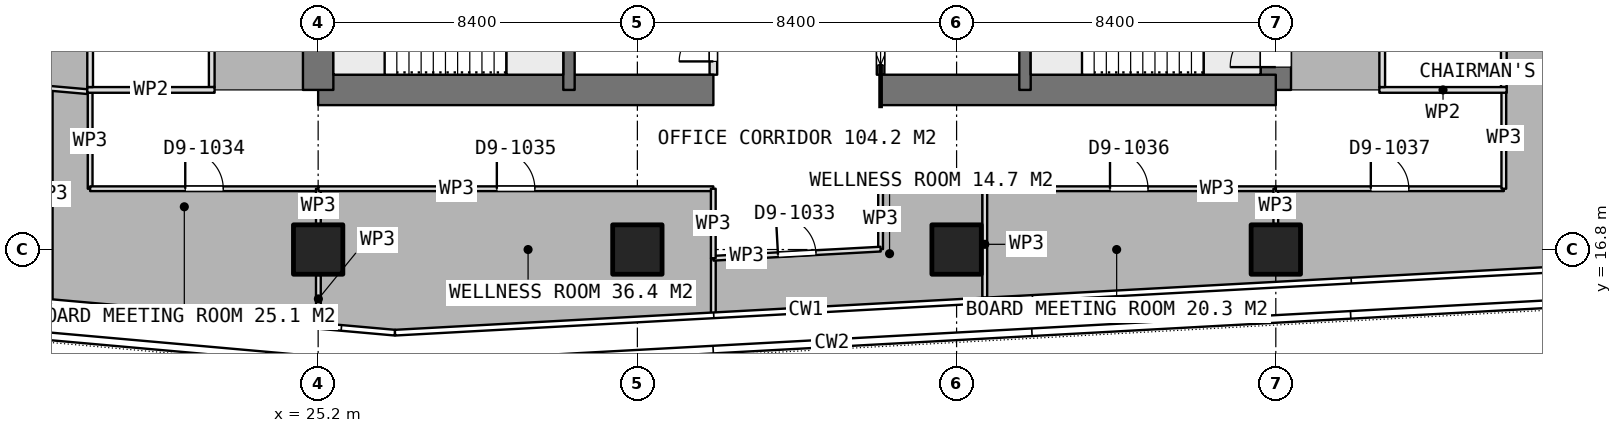
"""IFC4 building model, lengths in metres.
Left out: names, types, materials, properties, quantities, classifications, styles, units other than length and angle.
Written with IfcOpenShell. Run it as: python <this file> out.ifc"""

import sys

from ifc_helpers import new_model, si_unit, direction, frame, frame_2d, origin, origin_2d, place, context, subcontext, project, spatial, rectangle, extrude, element, fill, save


model = new_model("IFC4")
c1 = context("Model", 3, precision=1e-05, world=origin(), true_north=direction((0.0, 1.0)))
c2 = subcontext(c1, "Body", "Model", "MODEL_VIEW")
j1 = project(units=[si_unit("LENGTHUNIT", "METRE"), si_unit("PLANEANGLEUNIT", "RADIAN")], contexts=[c1])
p1 = place(None, origin())
s1 = spatial("IfcSite", under=j1, at=p1, CompositionType="ELEMENT")
p2 = place(p1, origin())
s2 = spatial("IfcBuilding", under=s1, at=p2, CompositionType="ELEMENT")
p3 = place(p2, frame((0.0, 0.0, 280.1)))
s3 = spatial("IfcBuildingStorey", under=s2, at=p3, CompositionType="ELEMENT", Elevation=280.1)
p4 = place(p3, frame((25.2, 21.0, 0.0), z_axis=(0.0, 0.0, 1.0), x_axis=(1.0, 0.0, 0.0)))
e1 = element("IfcWall", 1, at=p4, inside=s3, PredefinedType="SHEAR", context=c2, shape_type="SweptSolid", body=[
    extrude(rectangle(XDim=10.4, YDim=0.8, at=frame_2d((5.2, 0.0))), origin(), (0.0, 0.0, 1.0), 3.75),
])
p5 = place(p3, frame((40.0, 21.0, 0.0), z_axis=(0.0, 0.0, 1.0), x_axis=(1.0, 0.0, 0.0)))
e2 = element("IfcWall", 2, at=p5, inside=s3, PredefinedType="SHEAR", context=c2, shape_type="SweptSolid", body=[
    extrude(rectangle(XDim=10.4, YDim=0.8, at=frame_2d((5.2, 0.0))), origin(), (0.0, 0.0, 1.0), 3.75),
])
p6 = place(p3, frame((25.2, 21.0, 0.0), z_axis=(0.0, 0.0, 1.0), x_axis=(0.0, 1.0, 0.0)))
e3 = element("IfcWall", 3, at=p6, inside=s3, PredefinedType="SHEAR", context=c2, shape_type="SweptSolid", body=[
    extrude(rectangle(XDim=25.2, YDim=0.8, at=frame_2d((12.6, 0.0))), origin(), (0.0, 0.0, 1.0), 3.75),
])
p7 = place(p6, frame((7.8, 0.0, 0.0)))
e4 = element("IfcOpeningElement", 4, at=p7, cuts=e3, PredefinedType="OPENING", context=c2, shape_type="SweptSolid", body=[
    extrude(rectangle(XDim=1.2, YDim=2.1, at=frame_2d((0.6, 1.05))), frame((0.0, 0.41, 0.0), z_axis=(0.0, -1.0, 0.0), x_axis=(1.0, 0.0, 0.0)), (0.0, 0.0, 1.0), 0.82),
])
p8 = place(p6, frame((14.25, 0.0, 0.0)))
e5 = element("IfcOpeningElement", 5, at=p8, cuts=e3, PredefinedType="OPENING", context=c2, shape_type="SweptSolid", body=[
    extrude(rectangle(XDim=0.9, YDim=2.1, at=frame_2d((0.45, 1.05))), frame((0.0, 0.41, 0.0), z_axis=(0.0, -1.0, 0.0), x_axis=(1.0, 0.0, 0.0)), (0.0, 0.0, 1.0), 0.82),
])
p9 = place(p6, frame((16.85, 0.0, 0.0)))
e6 = element("IfcOpeningElement", 6, at=p9, cuts=e3, PredefinedType="OPENING", context=c2, shape_type="SweptSolid", body=[
    extrude(rectangle(XDim=0.9, YDim=2.1, at=frame_2d((0.45, 1.05))), frame((0.0, 0.41, 0.0), z_axis=(0.0, -1.0, 0.0), x_axis=(1.0, 0.0, 0.0)), (0.0, 0.0, 1.0), 0.82),
])
p10 = place(p6, frame((18.95, 0.0, 0.0)))
e7 = element("IfcOpeningElement", 7, at=p10, cuts=e3, PredefinedType="OPENING", context=c2, shape_type="SweptSolid", body=[
    extrude(rectangle(XDim=1.2, YDim=2.1, at=frame_2d((0.6, 1.05))), frame((0.0, 0.41, 0.0), z_axis=(0.0, -1.0, 0.0), x_axis=(1.0, 0.0, 0.0)), (0.0, 0.0, 1.0), 0.82),
])
p11 = place(p3, frame((50.4, 21.0, 0.0), z_axis=(0.0, 0.0, 1.0), x_axis=(0.0, 1.0, 0.0)))
e8 = element("IfcWall", 8, at=p11, inside=s3, PredefinedType="SHEAR", context=c2, shape_type="SweptSolid", body=[
    extrude(rectangle(XDim=25.2, YDim=0.8, at=frame_2d((12.6, 0.0))), origin(), (0.0, 0.0, 1.0), 3.75),
])
p12 = place(p11, frame((16.2, 0.0, 0.0)))
e9 = element("IfcOpeningElement", 9, at=p12, cuts=e8, PredefinedType="OPENING", context=c2, shape_type="SweptSolid", body=[
    extrude(rectangle(XDim=1.2, YDim=2.1, at=frame_2d((0.6, 1.05))), frame((0.0, 0.41, 0.0), z_axis=(0.0, -1.0, 0.0), x_axis=(1.0, 0.0, 0.0)), (0.0, 0.0, 1.0), 0.82),
])
p13 = place(p11, frame((10.05, 0.0, 0.0)))
e10 = element("IfcOpeningElement", 10, at=p13, cuts=e8, PredefinedType="OPENING", context=c2, shape_type="SweptSolid", body=[
    extrude(rectangle(XDim=0.9, YDim=2.1, at=frame_2d((0.45, 1.05))), frame((0.0, 0.41, 0.0), z_axis=(0.0, -1.0, 0.0), x_axis=(1.0, 0.0, 0.0)), (0.0, 0.0, 1.0), 0.82),
])
p14 = place(p11, frame((7.45, 0.0, 0.0)))
e11 = element("IfcOpeningElement", 11, at=p14, cuts=e8, PredefinedType="OPENING", context=c2, shape_type="SweptSolid", body=[
    extrude(rectangle(XDim=0.9, YDim=2.1, at=frame_2d((0.45, 1.05))), frame((0.0, 0.41, 0.0), z_axis=(0.0, -1.0, 0.0), x_axis=(1.0, 0.0, 0.0)), (0.0, 0.0, 1.0), 0.82),
])
p15 = place(p11, frame((0.6, 0.0, 0.0)))
e12 = element("IfcOpeningElement", 12, at=p15, cuts=e8, PredefinedType="OPENING", context=c2, shape_type="SweptSolid", body=[
    extrude(rectangle(XDim=1.2, YDim=2.1, at=frame_2d((0.6, 1.05))), frame((0.0, 0.41, 0.0), z_axis=(0.0, -1.0, 0.0), x_axis=(1.0, 0.0, 0.0)), (0.0, 0.0, 1.0), 0.82),
])
for number, where, z_axis, x_axis in (
    (13, (31.8, 21.0, 0.0), (0.0, 0.0, 1.0), (0.0, 1.0, 0.0)),
    (14, (43.8, 21.0, 0.0), (0.0, 0.0, 1.0), (0.0, 1.0, 0.0)),
):
    element("IfcWall", number, at=place(p3, frame(where, z_axis=z_axis, x_axis=x_axis)), inside=s3, PredefinedType="SHEAR", context=c2, shape_type="SweptSolid", body=[
        extrude(rectangle(XDim=25.2, YDim=0.3, at=frame_2d((12.6, 0.0))), origin(), (0.0, 0.0, 1.0), 3.75),
    ])
for number, where, z_axis, x_axis in (
    (15, (25.2, 16.8, 0.0), (0.0, 0.0, 1.0), (1.0, 0.0, 0.0)),
    (16, (33.6, 16.8, 0.0), (0.0, 0.0, 1.0), (1.0, 0.0, 0.0)),
    (17, (42.0, 16.8, 0.0), (0.0, 0.0, 1.0), (1.0, 0.0, 0.0)),
    (18, (50.4, 16.8, 0.0), (0.0, 0.0, 1.0), (1.0, 0.0, 0.0)),
):
    element("IfcColumn", number, at=place(p3, frame(where, z_axis=z_axis, x_axis=x_axis)), inside=s3, PredefinedType="COLUMN", context=c2, shape_type="SweptSolid", body=[
        extrude(rectangle(XDim=1.3, YDim=1.3, at=origin_2d()), origin(), (0.0, 0.0, 1.0), 3.75),
    ])
p16 = place(p3, frame((40.0, 21.4, 0.0), z_axis=(0.0, 0.0, 1.0), x_axis=(0.0, 1.0, 0.0)))
e19 = element("IfcWall", 19, at=p16, inside=s3, PredefinedType="PARTITIONING", context=c2, shape_type="SweptSolid", body=[
    extrude(rectangle(XDim=1.85, YDim=0.2, at=frame_2d((0.925, 0.0))), origin(), (0.0, 0.0, 1.0), 3.5),
])
p17 = place(p16, frame((0.25, 0.0, 0.0)))
e20 = element("IfcOpeningElement", 20, at=p17, cuts=e19, PredefinedType="OPENING", context=c2, shape_type="SweptSolid", body=[
    extrude(rectangle(XDim=1.1, YDim=2.1, at=frame_2d((0.55, 1.05))), frame((0.0, 0.11, 0.0), z_axis=(0.0, -1.0, 0.0), x_axis=(1.0, 0.0, 0.0)), (0.0, 0.0, 1.0), 0.22),
])
p18 = place(p3, frame((35.6, 21.4, 0.0), z_axis=(0.0, 0.0, 1.0), x_axis=(0.0, 1.0, 0.0)))
e21 = element("IfcWall", 21, at=p18, inside=s3, PredefinedType="PARTITIONING", context=c2, shape_type="SweptSolid", body=[
    extrude(rectangle(XDim=1.85, YDim=0.2, at=frame_2d((0.925, 0.0))), origin(), (0.0, 0.0, 1.0), 3.5),
])
p19 = place(p18, frame((0.35, 0.0, 0.0)))
e22 = element("IfcOpeningElement", 22, at=p19, cuts=e21, PredefinedType="OPENING", context=c2, shape_type="SweptSolid", body=[
    extrude(rectangle(XDim=0.9, YDim=2.1, at=frame_2d((0.45, 1.05))), frame((0.0, 0.11, 0.0), z_axis=(0.0, -1.0, 0.0), x_axis=(1.0, 0.0, 0.0)), (0.0, 0.0, 1.0), 0.22),
])
p20 = place(p3, frame((19.125, 21.0, 0.0), z_axis=(0.0, 0.0, 1.0), x_axis=(1.0, 0.0, 0.0)))
e23 = element("IfcWall", 23, at=p20, inside=s3, PredefinedType="PARTITIONING", context=c2, shape_type="SweptSolid", body=[
    extrude(rectangle(XDim=3.35, YDim=0.15, at=frame_2d((1.675, 0.0))), origin(), (0.0, 0.0, 1.0), 3.5),
])
p21 = place(p3, frame((19.2, 21.075, 0.0), z_axis=(0.0, 0.0, 1.0), x_axis=(0.0, 1.0, 0.0)))
e24 = element("IfcWall", 24, at=p21, inside=s3, PredefinedType="PARTITIONING", context=c2, shape_type="SweptSolid", body=[
    extrude(rectangle(XDim=6.85, YDim=0.15, at=frame_2d((3.425, 0.0))), origin(), (0.0, 0.0, 1.0), 3.5),
])
p22 = place(p3, frame((22.4, 21.075, 0.0), z_axis=(0.0, 0.0, 1.0), x_axis=(0.0, 1.0, 0.0)))
e25 = element("IfcWall", 25, at=p22, inside=s3, PredefinedType="PARTITIONING", context=c2, shape_type="SweptSolid", body=[
    extrude(rectangle(XDim=6.85, YDim=0.15, at=frame_2d((3.425, 0.0))), origin(), (0.0, 0.0, 1.0), 3.5),
])
p23 = place(p22, frame((2.925, 0.0, 0.0)))
e26 = element("IfcOpeningElement", 26, at=p23, cuts=e25, PredefinedType="OPENING", context=c2, shape_type="SweptSolid", body=[
    extrude(rectangle(XDim=1.0, YDim=2.1, at=frame_2d((0.5, 1.05))), frame((0.0, 0.085, 0.0), z_axis=(0.0, -1.0, 0.0), x_axis=(1.0, 0.0, 0.0)), (0.0, 0.0, 1.0), 0.17),
])
p24 = place(p3, frame((53.125, 21.0, 0.0), z_axis=(0.0, 0.0, 1.0), x_axis=(1.0, 0.0, 0.0)))
e27 = element("IfcWall", 27, at=p24, inside=s3, PredefinedType="PARTITIONING", context=c2, shape_type="SweptSolid", body=[
    extrude(rectangle(XDim=3.35, YDim=0.15, at=frame_2d((1.675, 0.0))), origin(), (0.0, 0.0, 1.0), 3.5),
])
p25 = place(p3, frame((53.2, 21.075, 0.0), z_axis=(0.0, 0.0, 1.0), x_axis=(0.0, 1.0, 0.0)))
e28 = element("IfcWall", 28, at=p25, inside=s3, PredefinedType="PARTITIONING", context=c2, shape_type="SweptSolid", body=[
    extrude(rectangle(XDim=6.85, YDim=0.15, at=frame_2d((3.425, 0.0))), origin(), (0.0, 0.0, 1.0), 3.5),
])
p26 = place(p25, frame((2.925, 0.0, 0.0)))
e29 = element("IfcOpeningElement", 29, at=p26, cuts=e28, PredefinedType="OPENING", context=c2, shape_type="SweptSolid", body=[
    extrude(rectangle(XDim=1.0, YDim=2.1, at=frame_2d((0.5, 1.05))), frame((0.0, 0.085, 0.0), z_axis=(0.0, -1.0, 0.0), x_axis=(1.0, 0.0, 0.0)), (0.0, 0.0, 1.0), 0.17),
])
p27 = place(p3, frame((56.4, 21.075, 0.0), z_axis=(0.0, 0.0, 1.0), x_axis=(0.0, 1.0, 0.0)))
e30 = element("IfcWall", 30, at=p27, inside=s3, PredefinedType="PARTITIONING", context=c2, shape_type="SweptSolid", body=[
    extrude(rectangle(XDim=6.85, YDim=0.15, at=frame_2d((3.425, 0.0))), origin(), (0.0, 0.0, 1.0), 3.5),
])
p28 = place(p3, frame((40.0, 16.811, 0.0), z_axis=(0.0, 0.0, 1.0), x_axis=(0.0, 1.0, 0.0)))
e31 = element("IfcWall", 31, at=p28, inside=s3, PredefinedType="PARTITIONING", context=c2, shape_type="SweptSolid", body=[
    extrude(rectangle(XDim=1.589, YDim=0.125, at=frame_2d((0.794, 0.0))), origin(), (0.0, 0.0, 1.0), 3.5),
])
p29 = place(p3, frame((40.0, 18.4, 0.0), z_axis=(0.0, 0.0, 1.0), x_axis=(1.0, 0.0, 0.0)))
e32 = element("IfcWall", 32, at=p29, inside=s3, PredefinedType="PARTITIONING", context=c2, shape_type="SweptSolid", body=[
    extrude(rectangle(XDim=2.673, YDim=0.125, at=frame_2d((1.336, 0.0))), origin(), (0.0, 0.0, 1.0), 3.5),
])
p30 = place(p3, frame((42.742, 18.337, 0.0), z_axis=(0.0, 0.0, 1.0), x_axis=(0.0, -1.0, 0.0)))
e33 = element("IfcWall", 33, at=p30, inside=s3, PredefinedType="PARTITIONING", context=c2, shape_type="SweptSolid", body=[
    extrude(rectangle(XDim=2.799, YDim=0.125, at=frame_2d((1.399, 0.0))), origin(), (0.0, 0.0, 1.0), 3.5),
])
p31 = place(p3, frame((35.599, 15.119, 0.0), z_axis=(0.0, 0.0, 1.0), x_axis=(0.0, 1.0, 0.0)))
e34 = element("IfcWall", 34, at=p31, inside=s3, PredefinedType="PARTITIONING", context=c2, shape_type="SweptSolid", body=[
    extrude(rectangle(XDim=1.452, YDim=0.125, at=frame_2d((0.726, 0.0))), origin(), (0.0, 0.0, 1.0), 3.5),
])
p32 = place(p3, frame((35.599, 16.571, 0.0), z_axis=(0.0, 0.0, 1.0), x_axis=(0.998516419886, 0.054451439074, 0.0)))
e35 = element("IfcWall", 35, at=p32, inside=s3, PredefinedType="PARTITIONING", context=c2, shape_type="SweptSolid", body=[
    extrude(rectangle(XDim=4.407, YDim=0.125, at=frame_2d((2.204, 0.0))), origin(), (0.0, 0.0, 1.0), 3.5),
])
p33 = place(p32, frame((1.704, 0.0, 0.0)))
e36 = element("IfcOpeningElement", 36, at=p33, cuts=e35, PredefinedType="OPENING", context=c2, shape_type="SweptSolid", body=[
    extrude(rectangle(XDim=1.0, YDim=2.1, at=frame_2d((0.5, 1.05))), frame((0.0, 0.073, 0.0), z_axis=(0.0, -1.0, 0.0), x_axis=(1.0, 0.0, 0.0)), (0.0, 0.0, 1.0), 0.145),
])
p34 = place(p3, frame((42.674, 18.4, 0.0), z_axis=(0.0, 0.0, 1.0), x_axis=(1.0, 0.0, 0.0)))
e37 = element("IfcWall", 37, at=p34, inside=s3, PredefinedType="PARTITIONING", context=c2, shape_type="SweptSolid", body=[
    extrude(rectangle(XDim=7.726, YDim=0.125, at=frame_2d((3.863, 0.0))), origin(), (0.0, 0.0, 1.0), 3.5),
])
p35 = place(p34, frame((3.363, 0.0, 0.0)))
e38 = element("IfcOpeningElement", 38, at=p35, cuts=e37, PredefinedType="OPENING", context=c2, shape_type="SweptSolid", body=[
    extrude(rectangle(XDim=1.0, YDim=2.1, at=frame_2d((0.5, 1.05))), frame((0.0, 0.073, 0.0), z_axis=(0.0, -1.0, 0.0), x_axis=(1.0, 0.0, 0.0)), (0.0, 0.0, 1.0), 0.145),
])
p36 = place(p3, frame((50.4, 18.4, 0.0), z_axis=(0.0, 0.0, 1.0), x_axis=(0.0, -1.0, 0.0)))
e39 = element("IfcWall", 39, at=p36, inside=s3, PredefinedType="PARTITIONING", context=c2, shape_type="SweptSolid", body=[
    extrude(rectangle(XDim=0.93, YDim=0.125, at=frame_2d((0.465, 0.0))), origin(), (0.0, 0.0, 1.0), 3.5),
])
p37 = place(p3, frame((50.401, 18.4, 0.0), z_axis=(0.0, 0.0, 1.0), x_axis=(1.0, 0.0, 0.0)))
e40 = element("IfcWall", 40, at=p37, inside=s3, PredefinedType="PARTITIONING", context=c2, shape_type="SweptSolid", body=[
    extrude(rectangle(XDim=5.999, YDim=0.125, at=frame_2d((3.0, 0.0))), origin(), (0.0, 0.0, 1.0), 3.5),
])
p38 = place(p37, frame((2.499, 0.0, 0.0)))
e41 = element("IfcOpeningElement", 41, at=p38, cuts=e40, PredefinedType="OPENING", context=c2, shape_type="SweptSolid", body=[
    extrude(rectangle(XDim=1.0, YDim=2.1, at=frame_2d((0.5, 1.05))), frame((0.0, 0.073, 0.0), z_axis=(0.0, -1.0, 0.0), x_axis=(1.0, 0.0, 0.0)), (0.0, 0.0, 1.0), 0.145),
])
p39 = place(p3, frame((56.4, 18.4, 0.0), z_axis=(0.0, 0.0, 1.0), x_axis=(0.0, 1.0, 0.0)))
e42 = element("IfcWall", 42, at=p39, inside=s3, PredefinedType="PARTITIONING", context=c2, shape_type="SweptSolid", body=[
    extrude(rectangle(XDim=2.675, YDim=0.125, at=frame_2d((1.337, 0.0))), origin(), (0.0, 0.0, 1.0), 3.5),
])
p40 = place(p3, frame((18.149, 21.041, 0.0), z_axis=(0.0, 0.0, 1.0), x_axis=(0.0, -1.0, 0.0)))
e43 = element("IfcWall", 43, at=p40, inside=s3, PredefinedType="PARTITIONING", context=c2, shape_type="SweptSolid", body=[
    extrude(rectangle(XDim=5.541, YDim=0.125, at=frame_2d((2.771, 0.0))), origin(), (0.0, 0.0, 1.0), 3.5),
])
p41 = place(p3, frame((18.15, 21.041, 0.0), z_axis=(0.0, 0.0, 1.0), x_axis=(0.996138836376, -0.087791905459, 0.0)))
e44 = element("IfcWall", 44, at=p41, inside=s3, PredefinedType="PARTITIONING", context=c2, shape_type="SweptSolid", body=[
    extrude(rectangle(XDim=0.979, YDim=0.125, at=frame_2d((0.489, 0.0))), origin(), (0.0, 0.0, 1.0), 3.5),
])
p42 = place(p3, frame((19.2, 20.925, 0.0), z_axis=(0.0, 0.0, 1.0), x_axis=(0.0, -1.0, 0.0)))
e45 = element("IfcWall", 45, at=p42, inside=s3, PredefinedType="PARTITIONING", context=c2, shape_type="SweptSolid", body=[
    extrude(rectangle(XDim=2.525, YDim=0.125, at=frame_2d((1.263, 0.0))), origin(), (0.0, 0.0, 1.0), 3.5),
])
p43 = place(p3, frame((19.2, 18.4, 0.0), z_axis=(0.0, 0.0, 1.0), x_axis=(1.0, 0.0, 0.0)))
e46 = element("IfcWall", 46, at=p43, inside=s3, PredefinedType="PARTITIONING", context=c2, shape_type="SweptSolid", body=[
    extrude(rectangle(XDim=6.006, YDim=0.125, at=frame_2d((3.003, 0.0))), origin(), (0.0, 0.0, 1.0), 3.5),
])
p44 = place(p43, frame((2.503, 0.0, 0.0)))
e47 = element("IfcOpeningElement", 47, at=p44, cuts=e46, PredefinedType="OPENING", context=c2, shape_type="SweptSolid", body=[
    extrude(rectangle(XDim=1.0, YDim=2.1, at=frame_2d((0.5, 1.05))), frame((0.0, 0.073, 0.0), z_axis=(0.0, -1.0, 0.0), x_axis=(1.0, 0.0, 0.0)), (0.0, 0.0, 1.0), 0.145),
])
p45 = place(p3, frame((25.206, 18.4, 0.0), z_axis=(0.0, 0.0, 1.0), x_axis=(0.0, -1.0, 0.0)))
e48 = element("IfcWall", 48, at=p45, inside=s3, PredefinedType="PARTITIONING", context=c2, shape_type="SweptSolid", body=[
    extrude(rectangle(XDim=0.93, YDim=0.125, at=frame_2d((0.465, 0.0))), origin(), (0.0, 0.0, 1.0), 3.5),
])
p46 = place(p3, frame((25.206, 16.13, 0.0), z_axis=(0.0, 0.0, 1.0), x_axis=(0.0, -1.0, 0.0)))
e49 = element("IfcWall", 49, at=p46, inside=s3, PredefinedType="PARTITIONING", context=c2, shape_type="SweptSolid", body=[
    extrude(rectangle(XDim=1.258, YDim=0.125, at=frame_2d((0.629, 0.0))), origin(), (0.0, 0.0, 1.0), 3.5),
])
p47 = place(p3, frame((25.207, 18.4, 0.0), z_axis=(0.0, 0.0, 1.0), x_axis=(1.0, 0.0, 0.0)))
e50 = element("IfcWall", 50, at=p47, inside=s3, PredefinedType="PARTITIONING", context=c2, shape_type="SweptSolid", body=[
    extrude(rectangle(XDim=10.391, YDim=0.125, at=frame_2d((5.195, 0.0))), origin(), (0.0, 0.0, 1.0), 3.5),
])
p48 = place(p47, frame((4.695, 0.0, 0.0)))
e51 = element("IfcOpeningElement", 51, at=p48, cuts=e50, PredefinedType="OPENING", context=c2, shape_type="SweptSolid", body=[
    extrude(rectangle(XDim=1.0, YDim=2.1, at=frame_2d((0.5, 1.05))), frame((0.0, 0.073, 0.0), z_axis=(0.0, -1.0, 0.0), x_axis=(1.0, 0.0, 0.0)), (0.0, 0.0, 1.0), 0.145),
])
p49 = place(p3, frame((35.598, 18.4, 0.0), z_axis=(0.0, 0.0, 1.0), x_axis=(0.0, -1.0, 0.0)))
e52 = element("IfcWall", 52, at=p49, inside=s3, PredefinedType="PARTITIONING", context=c2, shape_type="SweptSolid", body=[
    extrude(rectangle(XDim=1.829, YDim=0.125, at=frame_2d((0.915, 0.0))), origin(), (0.0, 0.0, 1.0), 3.5),
])
p50 = place(p17, origin())
e53 = element("IfcDoor", 53, at=p50, inside=s3, OperationType="SLIDING_TO_LEFT", PredefinedType="DOOR", context=c2, shape_type="SweptSolid", body=[
    extrude(rectangle(XDim=1.1, YDim=2.1, at=frame_2d((0.55, 1.05))), frame((0.0, 0.025, 0.0), z_axis=(0.0, -1.0, 0.0), x_axis=(1.0, 0.0, 0.0)), (0.0, 0.0, 1.0), 0.05),
])
fill(e20, e53)
p51 = place(p19, origin())
e54 = element("IfcDoor", 54, at=p51, inside=s3, OperationType="SINGLE_SWING_LEFT", PredefinedType="DOOR", context=c2, shape_type="SweptSolid", body=[
    extrude(rectangle(XDim=0.9, YDim=2.1, at=frame_2d((0.45, 1.05))), frame((0.0, 0.025, 0.0), z_axis=(0.0, -1.0, 0.0), x_axis=(1.0, 0.0, 0.0)), (0.0, 0.0, 1.0), 0.05),
])
fill(e22, e54)
p52 = place(p33, origin())
e55 = element("IfcDoor", 55, at=p52, inside=s3, OperationType="SINGLE_SWING_LEFT", PredefinedType="DOOR", context=c2, shape_type="SweptSolid", body=[
    extrude(rectangle(XDim=1.0, YDim=2.1, at=frame_2d((0.5, 1.05))), frame((0.0, 0.025, 0.0), z_axis=(0.0, -1.0, 0.0), x_axis=(1.0, 0.0, 0.0)), (0.0, 0.0, 1.0), 0.05),
])
fill(e36, e55)
p53 = place(p35, origin())
e56 = element("IfcDoor", 56, at=p53, inside=s3, OperationType="SINGLE_SWING_LEFT", PredefinedType="DOOR", context=c2, shape_type="SweptSolid", body=[
    extrude(rectangle(XDim=1.0, YDim=2.1, at=frame_2d((0.5, 1.05))), frame((0.0, 0.025, 0.0), z_axis=(0.0, -1.0, 0.0), x_axis=(1.0, 0.0, 0.0)), (0.0, 0.0, 1.0), 0.05),
])
fill(e38, e56)
p54 = place(p38, origin())
e57 = element("IfcDoor", 57, at=p54, inside=s3, OperationType="SINGLE_SWING_LEFT", PredefinedType="DOOR", context=c2, shape_type="SweptSolid", body=[
    extrude(rectangle(XDim=1.0, YDim=2.1, at=frame_2d((0.5, 1.05))), frame((0.0, 0.025, 0.0), z_axis=(0.0, -1.0, 0.0), x_axis=(1.0, 0.0, 0.0)), (0.0, 0.0, 1.0), 0.05),
])
fill(e41, e57)
p55 = place(p44, origin())
e58 = element("IfcDoor", 58, at=p55, inside=s3, OperationType="SINGLE_SWING_LEFT", PredefinedType="DOOR", context=c2, shape_type="SweptSolid", body=[
    extrude(rectangle(XDim=1.0, YDim=2.1, at=frame_2d((0.5, 1.05))), frame((0.0, 0.025, 0.0), z_axis=(0.0, -1.0, 0.0), x_axis=(1.0, 0.0, 0.0)), (0.0, 0.0, 1.0), 0.05),
])
fill(e47, e58)
p56 = place(p48, origin())
e59 = element("IfcDoor", 59, at=p56, inside=s3, OperationType="SINGLE_SWING_LEFT", PredefinedType="DOOR", context=c2, shape_type="SweptSolid", body=[
    extrude(rectangle(XDim=1.0, YDim=2.1, at=frame_2d((0.5, 1.05))), frame((0.0, 0.025, 0.0), z_axis=(0.0, -1.0, 0.0), x_axis=(1.0, 0.0, 0.0)), (0.0, 0.0, 1.0), 0.05),
])
fill(e51, e59)
p57 = place(p15, origin())
e60 = element("IfcDoor", 60, at=p57, inside=s3, OperationType="SINGLE_SWING_RIGHT", PredefinedType="DOOR", context=c2, shape_type="SweptSolid", body=[
    extrude(rectangle(XDim=1.2, YDim=2.1, at=frame_2d((0.6, 1.05))), frame((0.0, 0.025, 0.0), z_axis=(0.0, -1.0, 0.0), x_axis=(1.0, 0.0, 0.0)), (0.0, 0.0, 1.0), 0.05),
])
fill(e12, e60)
save(model, sys.argv[1])
